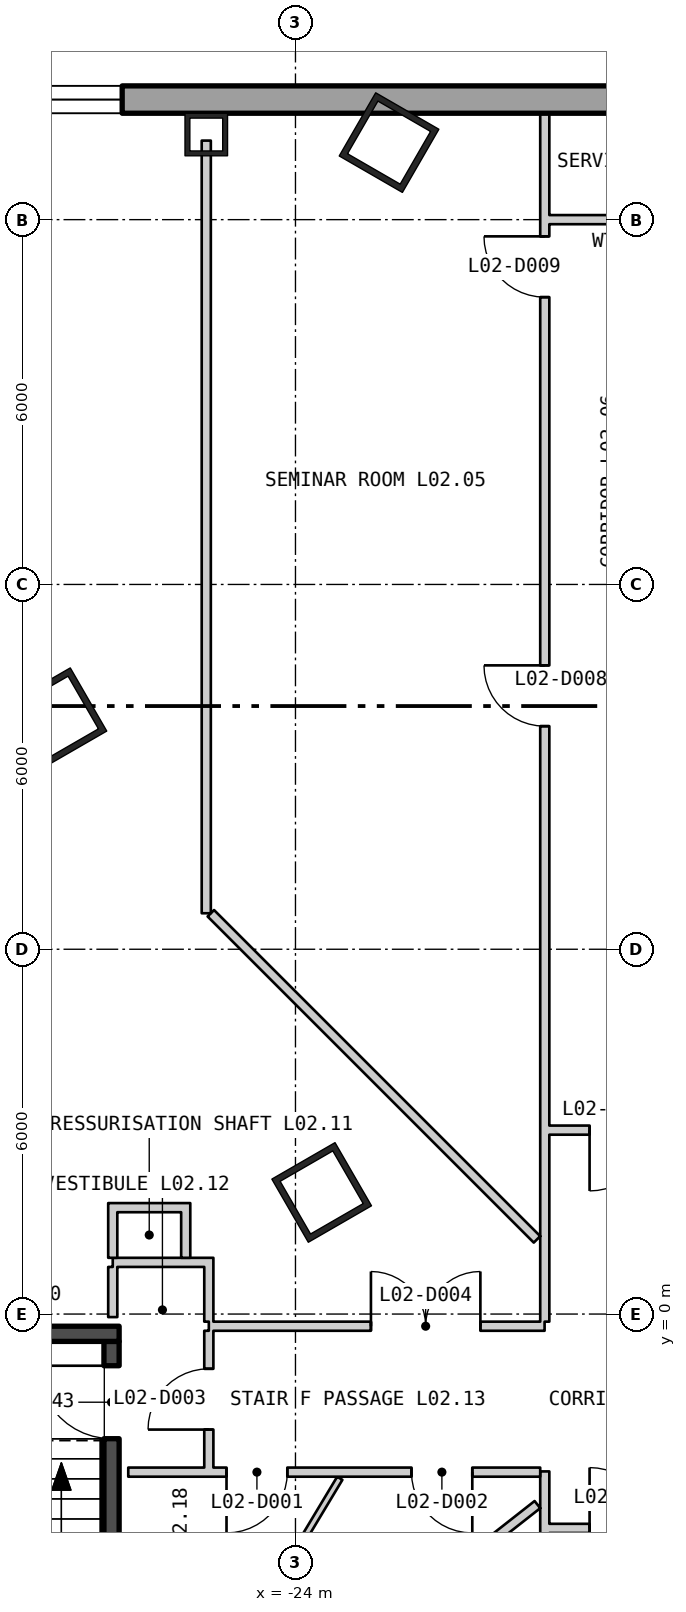
"""IFC4 building model, lengths in metres.
Left out: names, types, materials, properties, quantities, classifications, styles, units other than length and angle.
Written with IfcOpenShell. Run it as: python <this file> out.ifc"""

import sys

from ifc_helpers import new_model, si_unit, direction, frame, frame_2d, origin, origin_2d, place, context, subcontext, project, spatial, polyline, rectangle, hollow_rectangle, outline, extrude, element, fill, save


model = new_model("IFC4")
c1 = context("Model", 3, precision=1e-05, world=origin(), true_north=direction((0.0, 1.0)))
c2 = subcontext(c1, "Body", "Model", "MODEL_VIEW")
j1 = project(units=[si_unit("LENGTHUNIT", "METRE"), si_unit("PLANEANGLEUNIT", "RADIAN")], contexts=[c1])
p1 = place(None, origin())
s1 = spatial("IfcSite", under=j1, at=p1, CompositionType="ELEMENT")
p2 = place(p1, origin())
s2 = spatial("IfcBuilding", under=s1, at=p2, CompositionType="ELEMENT")
p3 = place(p2, frame((0.0, 0.0, 13.5)))
s3 = spatial("IfcBuildingStorey", under=s2, at=p3, CompositionType="ELEMENT", Elevation=13.5)
for number, where, z_axis, x_axis in (
    (1, (-22.461, 19.267, 0.0), (0.0, 0.0, 1.0), (-0.5, -0.866, 0.0)),
    (2, (-27.923, 9.808, 0.0), (0.0, 0.0, 1.0), (0.5, -0.866, 0.0)),
    (3, (-23.569, 2.0, 0.0), (0.0, 0.0, 1.0), (0.5, -0.866, 0.0)),
):
    element("IfcColumn", number, at=place(p3, frame(where, z_axis=z_axis, x_axis=x_axis)), inside=s3, PredefinedType="COLUMN", context=c2, shape_type="SweptSolid", body=[
        extrude(hollow_rectangle(XDim=1.2, YDim=1.2, WallThickness=0.1, at=origin_2d()), origin(), (0.0, 0.0, 1.0), 5.1),
    ])
p4 = place(p3, frame((-25.467, 19.4, 0.0), z_axis=(0.0, 0.0, 1.0), x_axis=(-1.0, 0.0, 0.0)))
e4 = element("IfcColumn", 4, at=p4, inside=s3, PredefinedType="COLUMN", context=c2, shape_type="SweptSolid", body=[
    extrude(hollow_rectangle(XDim=0.7, YDim=0.7, WallThickness=0.08, at=origin_2d()), origin(), (0.0, 0.0, 1.0), 5.1),
])
p5 = place(p3, frame((38.775, 19.975, -0.4), z_axis=(0.0, 0.0, 1.0), x_axis=(-1.0, 0.0, 0.0)))
e5 = element("IfcWall", 5, at=p5, inside=s3, PredefinedType="SOLIDWALL", context=c2, shape_type="SweptSolid", body=[
    extrude(outline(polyline([(-0.225, -0.225), (77.775, -0.225), (77.325, 0.225), (0.225, 0.225), (-0.225, -0.225)])), origin(), (0.0, 0.0, 1.0), 5.1),
])
p6 = place(p5, frame((1.958, 0.0, 1.3)))
e6 = element("IfcOpeningElement", 6, at=p6, cuts=e5, PredefinedType="OPENING", context=c2, shape_type="SweptSolid", body=[
    extrude(rectangle(XDim=3.6, YDim=3.2, at=frame_2d((1.8, 1.6))), frame((0.0, 0.235, 0.0), z_axis=(0.0, -1.0, 0.0), x_axis=(1.0, 0.0, 0.0)), (0.0, 0.0, 1.0), 0.47),
])
p7 = place(p5, frame((8.325, 0.0, 1.3)))
e7 = element("IfcOpeningElement", 7, at=p7, cuts=e5, PredefinedType="OPENING", context=c2, shape_type="SweptSolid", body=[
    extrude(rectangle(XDim=3.6, YDim=3.2, at=frame_2d((1.8, 1.6))), frame((0.0, 0.235, 0.0), z_axis=(0.0, -1.0, 0.0), x_axis=(1.0, 0.0, 0.0)), (0.0, 0.0, 1.0), 0.47),
])
p8 = place(p5, frame((20.952, 0.0, 1.3)))
e8 = element("IfcOpeningElement", 8, at=p8, cuts=e5, PredefinedType="OPENING", context=c2, shape_type="SweptSolid", body=[
    extrude(rectangle(XDim=3.6, YDim=3.2, at=frame_2d((1.8, 1.6))), frame((0.0, 0.235, 0.0), z_axis=(0.0, -1.0, 0.0), x_axis=(1.0, 0.0, 0.0)), (0.0, 0.0, 1.0), 0.47),
])
p9 = place(p5, frame((27.425, 0.0, 1.3)))
e9 = element("IfcOpeningElement", 9, at=p9, cuts=e5, PredefinedType="OPENING", context=c2, shape_type="SweptSolid", body=[
    extrude(rectangle(XDim=3.6, YDim=3.2, at=frame_2d((1.8, 1.6))), frame((0.0, 0.235, 0.0), z_axis=(0.0, -1.0, 0.0), x_axis=(1.0, 0.0, 0.0)), (0.0, 0.0, 1.0), 0.47),
])
p10 = place(p5, frame((46.525, 0.0, 1.3)))
e10 = element("IfcOpeningElement", 10, at=p10, cuts=e5, PredefinedType="OPENING", context=c2, shape_type="SweptSolid", body=[
    extrude(rectangle(XDim=3.6, YDim=3.2, at=frame_2d((1.8, 1.6))), frame((0.0, 0.235, 0.0), z_axis=(0.0, -1.0, 0.0), x_axis=(1.0, 0.0, 0.0)), (0.0, 0.0, 1.0), 0.47),
])
p11 = place(p5, frame((52.998, 0.0, 1.3)))
e11 = element("IfcOpeningElement", 11, at=p11, cuts=e5, PredefinedType="OPENING", context=c2, shape_type="SweptSolid", body=[
    extrude(rectangle(XDim=3.6, YDim=3.2, at=frame_2d((1.8, 1.6))), frame((0.0, 0.235, 0.0), z_axis=(0.0, -1.0, 0.0), x_axis=(1.0, 0.0, 0.0)), (0.0, 0.0, 1.0), 0.47),
])
p12 = place(p5, frame((65.625, 0.0, 1.3)))
e12 = element("IfcOpeningElement", 12, at=p12, cuts=e5, PredefinedType="OPENING", context=c2, shape_type="SweptSolid", body=[
    extrude(rectangle(XDim=3.6, YDim=3.2, at=frame_2d((1.8, 1.6))), frame((0.0, 0.235, 0.0), z_axis=(0.0, -1.0, 0.0), x_axis=(1.0, 0.0, 0.0)), (0.0, 0.0, 1.0), 0.47),
])
p13 = place(p5, frame((71.992, 0.0, 1.3)))
e13 = element("IfcOpeningElement", 13, at=p13, cuts=e5, PredefinedType="OPENING", context=c2, shape_type="SweptSolid", body=[
    extrude(rectangle(XDim=3.6, YDim=3.2, at=frame_2d((1.8, 1.6))), frame((0.0, 0.235, 0.0), z_axis=(0.0, -1.0, 0.0), x_axis=(1.0, 0.0, 0.0)), (0.0, 0.0, 1.0), 0.47),
])
p14 = place(p3, frame((-27.025, -7.75, 0.0), z_axis=(0.0, 0.0, 1.0), x_axis=(0.0, 1.0, 0.0)))
e14 = element("IfcWall", 14, at=p14, inside=s3, PredefinedType="SHEAR", context=c2, shape_type="SweptSolid", body=[
    extrude(rectangle(XDim=7.3, YDim=0.25, at=frame_2d((3.65, 0.0))), origin(), (0.0, 0.0, 1.0), 4.88),
])
p15 = place(p14, frame((5.7, 0.0, 0.0)))
e15 = element("IfcOpeningElement", 15, at=p15, cuts=e14, PredefinedType="OPENING", context=c2, shape_type="SweptSolid", body=[
    extrude(rectangle(XDim=1.2, YDim=2.1, at=frame_2d((0.6, 1.05))), frame((0.0, 0.135, 0.0), z_axis=(0.0, -1.0, 0.0), x_axis=(1.0, 0.0, 0.0)), (0.0, 0.0, 1.0), 0.27),
])
p16 = place(p3, frame((-30.4, -0.325, 0.0), z_axis=(0.0, 0.0, 1.0), x_axis=(1.0, 0.0, 0.0)))
e16 = element("IfcWall", 16, at=p16, inside=s3, PredefinedType="SHEAR", context=c2, shape_type="SweptSolid", body=[
    extrude(rectangle(XDim=3.5, YDim=0.25, at=frame_2d((1.75, 0.0))), origin(), (0.0, 0.0, 1.0), 4.88),
])
p17 = place(p3, frame((-27.08, 1.75, 0.0), z_axis=(0.0, 0.0, 1.0), x_axis=(1.0, 0.0, 0.0)))
e17 = element("IfcWall", 17, at=p17, inside=s3, PredefinedType="PARTITIONING", context=c2, shape_type="SweptSolid", body=[
    extrude(rectangle(XDim=1.35, YDim=0.15, at=frame_2d((0.675, 0.0))), origin(), (0.0, 0.0, 1.0), 4.88),
])
p18 = place(p3, frame((-27.005, -0.05, 0.0), z_axis=(0.0, 0.0, 1.0), x_axis=(0.0, 1.0, 0.0)))
e18 = element("IfcWall", 18, at=p18, inside=s3, PredefinedType="PARTITIONING", context=c2, shape_type="SweptSolid", body=[
    extrude(rectangle(XDim=0.825, YDim=0.15, at=frame_2d((0.412, 0.0))), origin(), (0.0, 0.0, 1.0), 4.88),
])
p19 = place(p3, frame((-27.005, 0.85, 0.0), z_axis=(0.0, 0.0, 1.0), x_axis=(1.0, 0.0, 0.0)))
e19 = element("IfcWall", 19, at=p19, inside=s3, PredefinedType="PARTITIONING", context=c2, shape_type="SweptSolid", body=[
    extrude(rectangle(XDim=1.275, YDim=0.15, at=frame_2d((0.637, 0.0))), origin(), (0.0, 0.0, 1.0), 4.88),
])
p20 = place(p3, frame((-27.005, 0.925, 0.0), z_axis=(0.0, 0.0, 1.0), x_axis=(0.0, 1.0, 0.0)))
e20 = element("IfcWall", 20, at=p20, inside=s3, PredefinedType="PARTITIONING", context=c2, shape_type="SweptSolid", body=[
    extrude(rectangle(XDim=0.75, YDim=0.15, at=frame_2d((0.375, 0.0))), origin(), (0.0, 0.0, 1.0), 4.88),
])
p21 = place(p3, frame((-26.75, -2.6, 0.0), z_axis=(0.0, 0.0, 1.0), x_axis=(1.0, 0.0, 0.0)))
e21 = element("IfcWall", 21, at=p21, inside=s3, PredefinedType="PARTITIONING", context=c2, shape_type="SweptSolid", body=[
    extrude(rectangle(XDim=6.775, YDim=0.15, at=frame_2d((3.388, 0.0))), origin(), (0.0, 0.0, 1.0), 4.88),
])
p22 = place(p21, frame((1.616, 0.0, 0.0)))
e22 = element("IfcOpeningElement", 22, at=p22, cuts=e21, PredefinedType="OPENING", context=c2, shape_type="SweptSolid", body=[
    extrude(rectangle(XDim=1.0, YDim=2.1, at=frame_2d((0.5, 1.05))), frame((0.0, 0.085, 0.0), z_axis=(0.0, -1.0, 0.0), x_axis=(1.0, 0.0, 0.0)), (0.0, 0.0, 1.0), 0.17),
])
p23 = place(p21, frame((4.658, 0.0, 0.0)))
e23 = element("IfcOpeningElement", 23, at=p23, cuts=e21, PredefinedType="OPENING", context=c2, shape_type="SweptSolid", body=[
    extrude(rectangle(XDim=1.0, YDim=2.1, at=frame_2d((0.5, 1.05))), frame((0.0, 0.085, 0.0), z_axis=(0.0, -1.0, 0.0), x_axis=(1.0, 0.0, 0.0)), (0.0, 0.0, 1.0), 0.17),
])
p24 = place(p3, frame((-25.805, 0.925, 0.0), z_axis=(0.0, 0.0, 1.0), x_axis=(0.0, 1.0, 0.0)))
e24 = element("IfcWall", 24, at=p24, inside=s3, PredefinedType="PARTITIONING", context=c2, shape_type="SweptSolid", body=[
    extrude(rectangle(XDim=0.75, YDim=0.15, at=frame_2d((0.375, 0.0))), origin(), (0.0, 0.0, 1.0), 4.88),
])
p25 = place(p3, frame((-25.73, 0.85, 0.0), z_axis=(0.0, 0.0, 1.0), x_axis=(1.0, 0.0, 0.0)))
e25 = element("IfcWall", 25, at=p25, inside=s3, PredefinedType="PARTITIONING", context=c2, shape_type="SweptSolid", body=[
    extrude(rectangle(XDim=0.23, YDim=0.15, at=frame_2d((0.115, 0.0))), origin(), (0.0, 0.0, 1.0), 4.88),
])
p26 = place(p3, frame((-25.672, -6.699, 0.0), z_axis=(0.0, 0.0, 1.0), x_axis=(0.5148425828, 0.857284733875, 0.0)))
e26 = element("IfcWall", 26, at=p26, inside=s3, PredefinedType="PARTITIONING", context=c2, shape_type="SweptSolid", body=[
    extrude(rectangle(XDim=4.664, YDim=0.1, at=frame_2d((2.332, 0.0))), origin(), (0.0, 0.0, 1.0), 4.88),
])
p27 = place(p3, frame((-25.467, 6.592, 0.0), z_axis=(0.0, 0.0, 1.0), x_axis=(0.0, 1.0, 0.0)))
e27 = element("IfcWall", 27, at=p27, inside=s3, PredefinedType="PARTITIONING", context=c2, shape_type="SweptSolid", body=[
    extrude(rectangle(XDim=7.736, YDim=0.15, at=frame_2d((3.868, 0.0))), origin(), (0.0, 0.0, 1.0), 4.88),
])
p28 = place(p3, frame((-25.467, 14.328, 0.0), z_axis=(0.0, 0.0, 1.0), x_axis=(0.0, 1.0, 0.0)))
e28 = element("IfcWall", 28, at=p28, inside=s3, PredefinedType="PARTITIONING", context=c2, shape_type="SweptSolid", body=[
    extrude(rectangle(XDim=4.972, YDim=0.15, at=frame_2d((2.486, 0.0))), origin(), (0.0, 0.0, 1.0), 4.28),
])
p29 = place(p3, frame((-25.425, -2.525, 0.0), z_axis=(0.0, 0.0, 1.0), x_axis=(0.0, 1.0, 0.0)))
e29 = element("IfcWall", 29, at=p29, inside=s3, PredefinedType="PARTITIONING", context=c2, shape_type="SweptSolid", body=[
    extrude(rectangle(XDim=2.25, YDim=0.15, at=frame_2d((1.125, 0.0))), origin(), (0.0, 0.0, 1.0), 4.19),
])
p30 = place(p29, frame((0.625, 0.0, 0.0)))
e30 = element("IfcOpeningElement", 30, at=p30, cuts=e29, PredefinedType="OPENING", context=c2, shape_type="SweptSolid", body=[
    extrude(rectangle(XDim=1.0, YDim=2.1, at=frame_2d((0.5, 1.05))), frame((0.0, 0.085, 0.0), z_axis=(0.0, -1.0, 0.0), x_axis=(1.0, 0.0, 0.0)), (0.0, 0.0, 1.0), 0.17),
])
p31 = place(p3, frame((-25.425, -0.2, 0.0), z_axis=(0.0, 0.0, 1.0), x_axis=(1.0, 0.0, 0.0)))
e31 = element("IfcWall", 31, at=p31, inside=s3, PredefinedType="PARTITIONING", context=c2, shape_type="SweptSolid", body=[
    extrude(rectangle(XDim=5.522, YDim=0.15, at=frame_2d((2.761, 0.0))), origin(), (0.0, 0.0, 1.0), 4.88),
])
p32 = place(p31, frame((2.666, 0.0, 0.0)))
e32 = element("IfcOpeningElement", 32, at=p32, cuts=e31, PredefinedType="OPENING", context=c2, shape_type="SweptSolid", body=[
    extrude(rectangle(XDim=1.8, YDim=2.1, at=frame_2d((0.9, 1.05))), frame((0.0, 0.085, 0.0), z_axis=(0.0, -1.0, 0.0), x_axis=(1.0, 0.0, 0.0)), (0.0, 0.0, 1.0), 0.17),
])
p33 = place(p3, frame((-25.425, -0.125, 0.0), z_axis=(0.0, 0.0, 1.0), x_axis=(0.0, 1.0, 0.0)))
e33 = element("IfcWall", 33, at=p33, inside=s3, PredefinedType="PARTITIONING", context=c2, shape_type="SweptSolid", body=[
    extrude(rectangle(XDim=1.05, YDim=0.15, at=frame_2d((0.525, 0.0))), origin(), (0.0, 0.0, 1.0), 4.19),
])
p34 = place(p3, frame((-25.392, 6.592, 0.0), z_axis=(0.0, 0.0, 1.0), x_axis=(0.707106781187, -0.707106781187, 0.0)))
e34 = element("IfcWall", 34, at=p34, inside=s3, PredefinedType="PARTITIONING", context=c2, shape_type="SweptSolid", body=[
    extrude(rectangle(XDim=7.586, YDim=0.15, at=frame_2d((3.793, 0.0))), origin(), (0.0, 0.0, 1.0), 4.88),
])
p35 = place(p3, frame((-24.745, -6.846, 0.0), z_axis=(0.0, 0.0, 1.0), x_axis=(0.786295235231, 0.617850955372, 0.0)))
e35 = element("IfcWall", 35, at=p35, inside=s3, PredefinedType="PARTITIONING", context=c2, shape_type="SweptSolid", body=[
    extrude(rectangle(XDim=6.008, YDim=0.15, at=frame_2d((3.004, 0.0))), origin(), (0.0, 0.0, 1.0), 4.88),
])
p36 = place(p3, frame((-19.975, 18.0, 0.0), z_axis=(0.0, 0.0, 1.0), x_axis=(1.0, 0.0, 0.0)))
e36 = element("IfcWall", 36, at=p36, inside=s3, PredefinedType="PARTITIONING", context=c2, shape_type="SweptSolid", body=[
    extrude(rectangle(XDim=2.475, YDim=0.15, at=frame_2d((1.238, 0.0))), origin(), (0.0, 0.0, 1.0), 4.33),
])
p37 = place(p3, frame((-19.9, -23.775, 0.0), z_axis=(0.0, 0.0, 1.0), x_axis=(0.0, 1.0, 0.0)))
e37 = element("IfcWall", 37, at=p37, inside=s3, PredefinedType="PARTITIONING", context=c2, shape_type="SweptSolid", body=[
    extrude(rectangle(XDim=21.187, YDim=0.15, at=frame_2d((10.594, 0.0))), origin(), (0.0, 0.0, 1.0), 4.88),
])
p38 = place(p37, frame((3.898, 0.0, 0.0)))
e38 = element("IfcOpeningElement", 38, at=p38, cuts=e37, PredefinedType="OPENING", context=c2, shape_type="SweptSolid", body=[
    extrude(rectangle(XDim=1.0, YDim=2.1, at=frame_2d((0.5, 1.05))), frame((0.0, 0.085, 0.0), z_axis=(0.0, -1.0, 0.0), x_axis=(1.0, 0.0, 0.0)), (0.0, 0.0, 1.0), 0.17),
])
p39 = place(p37, frame((10.832, 0.0, 0.0)))
e39 = element("IfcOpeningElement", 39, at=p39, cuts=e37, PredefinedType="OPENING", context=c2, shape_type="SweptSolid", body=[
    extrude(rectangle(XDim=1.0, YDim=2.1, at=frame_2d((0.5, 1.05))), frame((0.0, 0.085, 0.0), z_axis=(0.0, -1.0, 0.0), x_axis=(1.0, 0.0, 0.0)), (0.0, 0.0, 1.0), 0.17),
])
p40 = place(p37, frame((14.688, 0.0, 0.0)))
e40 = element("IfcOpeningElement", 40, at=p40, cuts=e37, PredefinedType="OPENING", context=c2, shape_type="SweptSolid", body=[
    extrude(rectangle(XDim=1.0, YDim=2.1, at=frame_2d((0.5, 1.05))), frame((0.0, 0.085, 0.0), z_axis=(0.0, -1.0, 0.0), x_axis=(1.0, 0.0, 0.0)), (0.0, 0.0, 1.0), 0.17),
])
p41 = place(p3, frame((-19.9, -0.125, 0.0), z_axis=(0.0, 0.0, 1.0), x_axis=(0.0, 1.0, 0.0)))
e41 = element("IfcWall", 41, at=p41, inside=s3, PredefinedType="PARTITIONING", context=c2, shape_type="SweptSolid", body=[
    extrude(rectangle(XDim=1.15, YDim=0.15, at=frame_2d((0.575, 0.0))), origin(), (0.0, 0.0, 1.0), 4.88),
])
p42 = place(p3, frame((-19.9, 1.025, 0.0), z_axis=(0.0, 0.0, 1.0), x_axis=(0.0, 1.0, 0.0)))
e42 = element("IfcWall", 42, at=p42, inside=s3, PredefinedType="PARTITIONING", context=c2, shape_type="SweptSolid", body=[
    extrude(rectangle(XDim=16.9, YDim=0.15, at=frame_2d((8.45, 0.0))), origin(), (0.0, 0.0, 1.0), 4.88),
])
p43 = place(p42, frame((8.644, 0.0, 0.0)))
e43 = element("IfcOpeningElement", 43, at=p43, cuts=e42, PredefinedType="OPENING", context=c2, shape_type="SweptSolid", body=[
    extrude(rectangle(XDim=1.0, YDim=2.1, at=frame_2d((0.5, 1.05))), frame((0.0, 0.085, 0.0), z_axis=(0.0, -1.0, 0.0), x_axis=(1.0, 0.0, 0.0)), (0.0, 0.0, 1.0), 0.17),
])
p44 = place(p42, frame((15.7, 0.0, 0.0)))
e44 = element("IfcOpeningElement", 44, at=p44, cuts=e42, PredefinedType="OPENING", context=c2, shape_type="SweptSolid", body=[
    extrude(rectangle(XDim=1.0, YDim=2.1, at=frame_2d((0.5, 1.05))), frame((0.0, 0.085, 0.0), z_axis=(0.0, -1.0, 0.0), x_axis=(1.0, 0.0, 0.0)), (0.0, 0.0, 1.0), 0.17),
])
p45 = place(p3, frame((-19.9, 18.075, 0.0), z_axis=(0.0, 0.0, 1.0), x_axis=(0.0, 1.0, 0.0)))
e45 = element("IfcWall", 45, at=p45, inside=s3, PredefinedType="PARTITIONING", context=c2, shape_type="SweptSolid", body=[
    extrude(rectangle(XDim=1.675, YDim=0.15, at=frame_2d((0.838, 0.0))), origin(), (0.0, 0.0, 1.0), 4.88),
])
p46 = place(p3, frame((-19.825, -3.525, 0.0), z_axis=(0.0, 0.0, 1.0), x_axis=(1.0, 0.0, 0.0)))
e46 = element("IfcWall", 46, at=p46, inside=s3, PredefinedType="PARTITIONING", context=c2, shape_type="SweptSolid", body=[
    extrude(rectangle(XDim=2.325, YDim=0.15, at=frame_2d((1.163, 0.0))), origin(), (0.0, 0.0, 1.0), 4.88),
])
p47 = place(p46, frame((0.662, 0.0, 0.0)))
e47 = element("IfcOpeningElement", 47, at=p47, cuts=e46, PredefinedType="OPENING", context=c2, shape_type="SweptSolid", body=[
    extrude(rectangle(XDim=1.0, YDim=2.1, at=frame_2d((0.5, 1.05))), frame((0.0, 0.085, 0.0), z_axis=(0.0, -1.0, 0.0), x_axis=(1.0, 0.0, 0.0)), (0.0, 0.0, 1.0), 0.17),
])
p48 = place(p3, frame((-19.825, 3.025, 0.0), z_axis=(0.0, 0.0, 1.0), x_axis=(1.0, 0.0, 0.0)))
e48 = element("IfcWall", 48, at=p48, inside=s3, PredefinedType="PARTITIONING", context=c2, shape_type="SweptSolid", body=[
    extrude(rectangle(XDim=2.325, YDim=0.15, at=frame_2d((1.163, 0.0))), origin(), (0.0, 0.0, 1.0), 4.33),
])
p49 = place(p48, frame((0.662, 0.0, 0.0)))
e49 = element("IfcOpeningElement", 49, at=p49, cuts=e48, PredefinedType="OPENING", context=c2, shape_type="SweptSolid", body=[
    extrude(rectangle(XDim=1.0, YDim=2.1, at=frame_2d((0.5, 1.05))), frame((0.0, 0.085, 0.0), z_axis=(0.0, -1.0, 0.0), x_axis=(1.0, 0.0, 0.0)), (0.0, 0.0, 1.0), 0.17),
])
p50 = place(p12, origin())
e50 = element("IfcWindow", 50, at=p50, inside=s3, PartitioningType="SINGLE_PANEL", PredefinedType="WINDOW", context=c2, shape_type="SweptSolid", body=[
    extrude(rectangle(XDim=3.6, YDim=3.2, at=frame_2d((1.8, 1.6))), frame((0.0, 0.105, 0.0), z_axis=(0.0, -1.0, 0.0), x_axis=(1.0, 0.0, 0.0)), (0.0, 0.0, 1.0), 0.06),
])
fill(e12, e50)
p51 = place(p15, origin())
e51 = element("IfcDoor", 51, at=p51, inside=s3, OperationType="SINGLE_SWING_LEFT", PredefinedType="DOOR", context=c2, shape_type="SweptSolid", body=[
    extrude(rectangle(XDim=1.2, YDim=2.1, at=frame_2d((0.6, 1.05))), frame((0.0, 0.025, 0.0), z_axis=(0.0, -1.0, 0.0), x_axis=(1.0, 0.0, 0.0)), (0.0, 0.0, 1.0), 0.05),
])
fill(e15, e51)
p52 = place(p22, origin())
e52 = element("IfcDoor", 52, at=p52, inside=s3, OperationType="SINGLE_SWING_LEFT", PredefinedType="DOOR", context=c2, shape_type="SweptSolid", body=[
    extrude(rectangle(XDim=1.0, YDim=2.1, at=frame_2d((0.5, 1.05))), frame((0.0, 0.025, 0.0), z_axis=(0.0, -1.0, 0.0), x_axis=(1.0, 0.0, 0.0)), (0.0, 0.0, 1.0), 0.05),
])
fill(e22, e52)
p53 = place(p23, origin())
e53 = element("IfcDoor", 53, at=p53, inside=s3, OperationType="SINGLE_SWING_RIGHT", PredefinedType="DOOR", context=c2, shape_type="SweptSolid", body=[
    extrude(rectangle(XDim=1.0, YDim=2.1, at=frame_2d((0.5, 1.05))), frame((0.0, 0.025, 0.0), z_axis=(0.0, -1.0, 0.0), x_axis=(1.0, 0.0, 0.0)), (0.0, 0.0, 1.0), 0.05),
])
fill(e23, e53)
p54 = place(p30, origin())
e54 = element("IfcDoor", 54, at=p54, inside=s3, OperationType="SINGLE_SWING_RIGHT", PredefinedType="DOOR", context=c2, shape_type="SweptSolid", body=[
    extrude(rectangle(XDim=1.0, YDim=2.1, at=frame_2d((0.5, 1.05))), frame((0.0, 0.025, 0.0), z_axis=(0.0, -1.0, 0.0), x_axis=(1.0, 0.0, 0.0)), (0.0, 0.0, 1.0), 0.05),
])
fill(e30, e54)
p55 = place(p32, origin())
e55 = element("IfcDoor", 55, at=p55, inside=s3, OperationType="DOUBLE_DOOR_SINGLE_SWING", PredefinedType="DOOR", context=c2, shape_type="SweptSolid", body=[
    extrude(rectangle(XDim=1.8, YDim=2.1, at=frame_2d((0.9, 1.05))), frame((0.0, 0.025, 0.0), z_axis=(0.0, -1.0, 0.0), x_axis=(1.0, 0.0, 0.0)), (0.0, 0.0, 1.0), 0.05),
])
fill(e32, e55)
p56 = place(p43, origin())
e56 = element("IfcDoor", 56, at=p56, inside=s3, OperationType="SINGLE_SWING_LEFT", PredefinedType="DOOR", context=c2, shape_type="SweptSolid", body=[
    extrude(rectangle(XDim=1.0, YDim=2.1, at=frame_2d((0.5, 1.05))), frame((0.0, 0.025, 0.0), z_axis=(0.0, -1.0, 0.0), x_axis=(1.0, 0.0, 0.0)), (0.0, 0.0, 1.0), 0.05),
])
fill(e43, e56)
p57 = place(p44, origin())
e57 = element("IfcDoor", 57, at=p57, inside=s3, OperationType="SINGLE_SWING_LEFT", PredefinedType="DOOR", context=c2, shape_type="SweptSolid", body=[
    extrude(rectangle(XDim=1.0, YDim=2.1, at=frame_2d((0.5, 1.05))), frame((0.0, 0.025, 0.0), z_axis=(0.0, -1.0, 0.0), x_axis=(1.0, 0.0, 0.0)), (0.0, 0.0, 1.0), 0.05),
])
fill(e44, e57)
p58 = place(p47, origin())
e58 = element("IfcDoor", 58, at=p58, inside=s3, OperationType="SINGLE_SWING_RIGHT", PredefinedType="DOOR", context=c2, shape_type="SweptSolid", body=[
    extrude(rectangle(XDim=1.0, YDim=2.1, at=frame_2d((0.5, 1.05))), frame((0.0, 0.025, 0.0), z_axis=(0.0, -1.0, 0.0), x_axis=(1.0, 0.0, 0.0)), (0.0, 0.0, 1.0), 0.05),
])
fill(e47, e58)
p59 = place(p49, origin())
e59 = element("IfcDoor", 59, at=p59, inside=s3, OperationType="SINGLE_SWING_LEFT", PredefinedType="DOOR", context=c2, shape_type="SweptSolid", body=[
    extrude(rectangle(XDim=1.0, YDim=2.1, at=frame_2d((0.5, 1.05))), frame((0.0, 0.025, 0.0), z_axis=(0.0, -1.0, 0.0), x_axis=(1.0, 0.0, 0.0)), (0.0, 0.0, 1.0), 0.05),
])
fill(e49, e59)
save(model, sys.argv[1])
